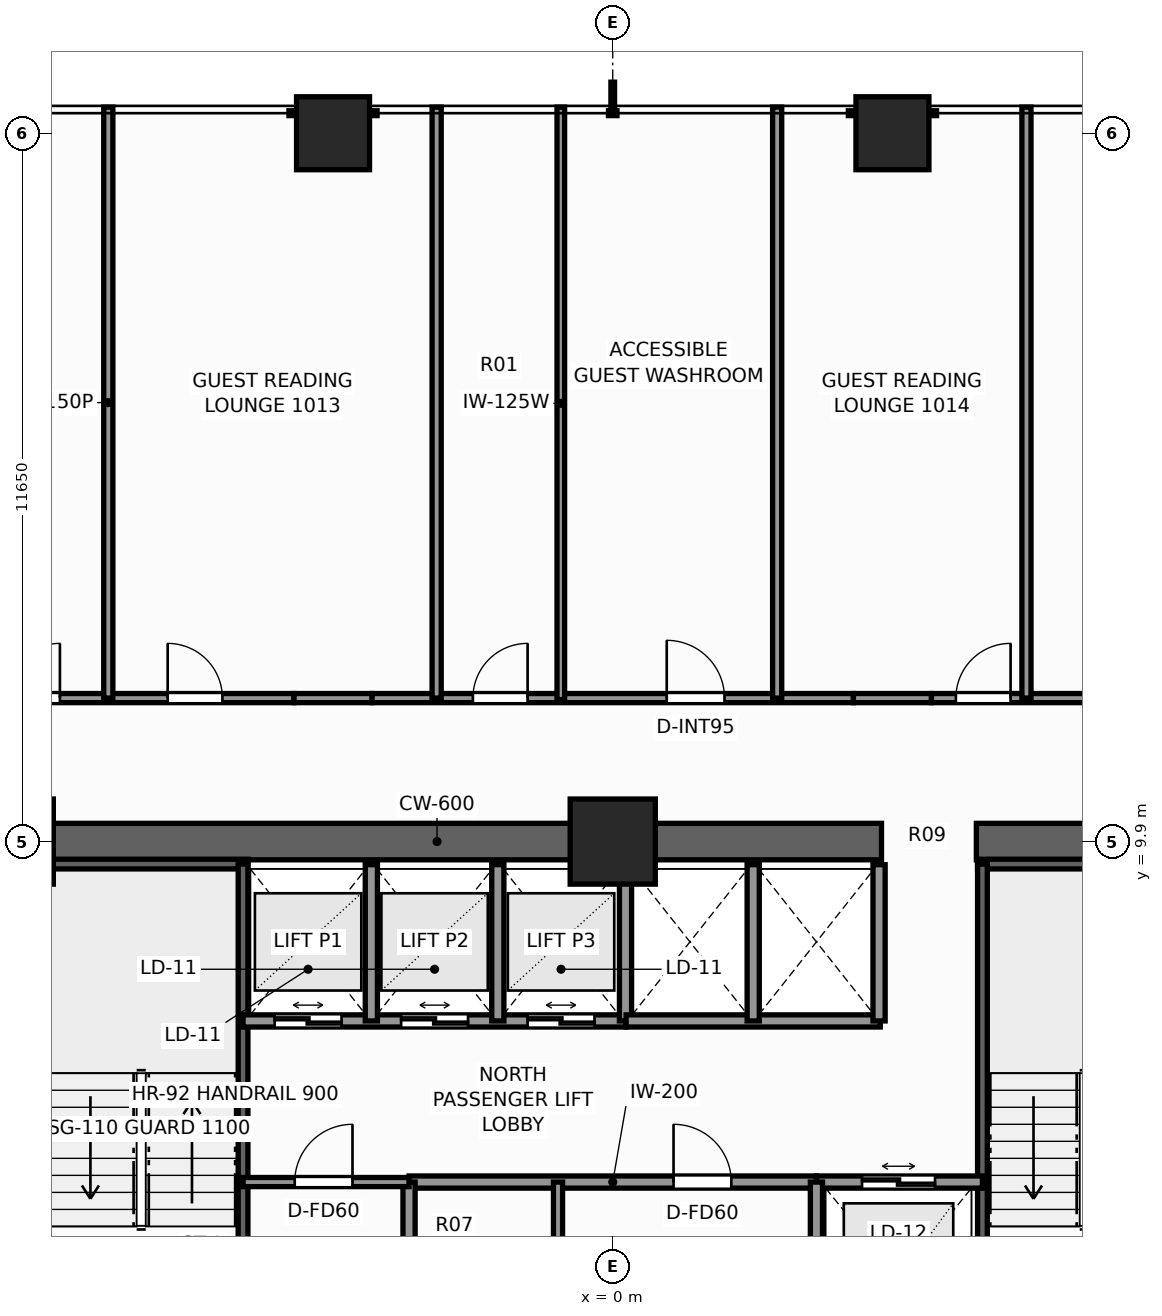
"""IFC4 building model, lengths in metres.
Left out: names, types, materials, properties, quantities, classifications, styles, units other than length and angle.
Written with IfcOpenShell. Run it as: python <this file> out.ifc"""

import sys

from ifc_helpers import new_model, si_unit, direction, frame, frame_2d, origin, origin_2d, place, context, subcontext, project, spatial, rectangle, extrude, element, fill, save


model = new_model("IFC4")
c1 = context("Model", 3, precision=1e-05, world=origin(), true_north=direction((0.0, 1.0)))
c2 = subcontext(c1, "Body", "Model", "MODEL_VIEW")
j1 = project(units=[si_unit("LENGTHUNIT", "METRE"), si_unit("PLANEANGLEUNIT", "RADIAN")], contexts=[c1])
p1 = place(None, origin())
s1 = spatial("IfcSite", under=j1, at=p1, CompositionType="ELEMENT")
p2 = place(p1, origin())
s2 = spatial("IfcBuilding", under=s1, at=p2, CompositionType="ELEMENT")
p3 = place(p2, frame((0.0, 0.0, 37.0)))
s3 = spatial("IfcBuildingStorey", under=s2, at=p3, CompositionType="ELEMENT", Elevation=37.0)
p4 = place(p3, frame((-10.2, 9.9, 0.0), z_axis=(0.0, 0.0, 1.0), x_axis=(1.0, 0.0, 0.0)))
e1 = element("IfcWall", 1, at=p4, inside=s3, PredefinedType="SHEAR", context=c2, shape_type="SweptSolid", body=[
    extrude(rectangle(XDim=14.62, YDim=0.6, at=frame_2d((7.31, 0.0))), origin(), (0.0, 0.0, 1.0), 3.3),
])
p5 = place(p3, frame((5.98, 9.9, 0.0), z_axis=(0.0, 0.0, 1.0), x_axis=(1.0, 0.0, 0.0)))
e2 = element("IfcWall", 2, at=p5, inside=s3, PredefinedType="SHEAR", context=c2, shape_type="SweptSolid", body=[
    extrude(rectangle(XDim=4.22, YDim=0.6, at=frame_2d((2.11, 0.0))), origin(), (0.0, 0.0, 1.0), 3.3),
])
for number, where, z_axis, x_axis in (
    (3, (-9.9, 9.9, 0.0), (0.0, 0.0, 1.0), (1.0, 0.0, 0.0)),
    (4, (0.0, 9.9, 0.0), (0.0, 0.0, 1.0), (1.0, 0.0, 0.0)),
):
    element("IfcColumn", number, at=place(p3, frame(where, z_axis=z_axis, x_axis=x_axis)), inside=s3, PredefinedType="COLUMN", context=c2, shape_type="SweptSolid", body=[
        extrude(rectangle(XDim=1.4, YDim=1.4, at=origin_2d()), origin(), (0.0, 0.0, 1.0), 3.3),
    ])
for number, where, z_axis, x_axis in (
    (5, (-4.6, 21.55, 0.0), (0.0, 0.0, 1.0), (1.0, 0.0, 0.0)),
    (6, (4.6, 21.55, 0.0), (0.0, 0.0, 1.0), (1.0, 0.0, 0.0)),
):
    element("IfcColumn", number, at=place(p3, frame(where, z_axis=z_axis, x_axis=x_axis)), inside=s3, PredefinedType="COLUMN", context=c2, shape_type="SweptSolid", body=[
        extrude(rectangle(XDim=1.2, YDim=1.2, at=origin_2d()), origin(), (0.0, 0.0, 1.0), 3.3),
    ])
p6 = place(p3, frame((-9.52, 9.53, 0.0), z_axis=(0.0, 0.0, 1.0), x_axis=(1.0, 0.0, 0.0)))
e7 = element("IfcWall", 7, at=p6, inside=s3, PredefinedType="SHEAR", context=c2, shape_type="SweptSolid", body=[
    extrude(rectangle(XDim=3.52, YDim=0.16, at=frame_2d((1.76, 0.0))), origin(), (0.0, 0.0, 1.0), 3.3),
])
p7 = place(p3, frame((-6.08, 1.97, 0.0), z_axis=(0.0, 0.0, 1.0), x_axis=(0.0, 1.0, 0.0)))
e8 = element("IfcWall", 8, at=p7, inside=s3, PredefinedType="SHEAR", context=c2, shape_type="SweptSolid", body=[
    extrude(rectangle(XDim=7.56, YDim=0.16, at=frame_2d((3.78, 0.0))), origin(), (0.0, 0.0, 1.0), 3.3),
])
p8 = place(p3, frame((6.0, 9.53, 0.0), z_axis=(0.0, 0.0, 1.0), x_axis=(1.0, 0.0, 0.0)))
e9 = element("IfcWall", 9, at=p8, inside=s3, PredefinedType="SHEAR", context=c2, shape_type="SweptSolid", body=[
    extrude(rectangle(XDim=3.52, YDim=0.16, at=frame_2d((1.76, 0.0))), origin(), (0.0, 0.0, 1.0), 3.3),
])
p9 = place(p3, frame((6.08, 1.97, 0.0), z_axis=(0.0, 0.0, 1.0), x_axis=(0.0, 1.0, 0.0)))
e10 = element("IfcWall", 10, at=p9, inside=s3, PredefinedType="SHEAR", context=c2, shape_type="SweptSolid", body=[
    extrude(rectangle(XDim=7.56, YDim=0.16, at=frame_2d((3.78, 0.0))), origin(), (0.0, 0.0, 1.0), 3.3),
])
p10 = place(p3, frame((3.35, 4.3, 0.0), z_axis=(0.0, 0.0, 1.0), x_axis=(1.0, 0.0, 0.0)))
e11 = element("IfcWall", 11, at=p10, inside=s3, PredefinedType="SOLIDWALL", context=c2, shape_type="SweptSolid", body=[
    extrude(rectangle(XDim=2.73, YDim=0.2, at=frame_2d((1.365, 0.0))), origin(), (0.0, 0.0, 1.0), 3.06),
])
p11 = place(p10, frame((0.75, 0.0, 0.0)))
e12 = element("IfcOpeningElement", 12, at=p11, cuts=e11, PredefinedType="OPENING", context=c2, shape_type="SweptSolid", body=[
    extrude(rectangle(XDim=1.2, YDim=2.25, at=frame_2d((0.6, 1.125))), frame((0.0, 0.11, 0.0), z_axis=(0.0, -1.0, 0.0), x_axis=(1.0, 0.0, 0.0)), (0.0, 0.0, 1.0), 0.22),
])
p12 = place(p3, frame((-6.08, 6.95, 0.0), z_axis=(0.0, 0.0, 1.0), x_axis=(1.0, 0.0, 0.0)))
e13 = element("IfcWall", 13, at=p12, inside=s3, PredefinedType="SOLIDWALL", context=c2, shape_type="SweptSolid", body=[
    extrude(rectangle(XDim=6.3, YDim=0.2, at=frame_2d((3.15, 0.0))), origin(), (0.0, 0.0, 1.0), 3.06),
])
p13 = place(p12, frame((0.52, 0.0, 0.0)))
e14 = element("IfcOpeningElement", 14, at=p13, cuts=e13, PredefinedType="OPENING", context=c2, shape_type="SweptSolid", body=[
    extrude(rectangle(XDim=1.1, YDim=2.2, at=frame_2d((0.55, 1.1))), frame((0.0, 0.11, 0.0), z_axis=(0.0, -1.0, 0.0), x_axis=(1.0, 0.0, 0.0)), (0.0, 0.0, 1.0), 0.22),
])
p14 = place(p12, frame((2.6, 0.0, 0.0)))
e15 = element("IfcOpeningElement", 15, at=p14, cuts=e13, PredefinedType="OPENING", context=c2, shape_type="SweptSolid", body=[
    extrude(rectangle(XDim=1.1, YDim=2.2, at=frame_2d((0.55, 1.1))), frame((0.0, 0.11, 0.0), z_axis=(0.0, -1.0, 0.0), x_axis=(1.0, 0.0, 0.0)), (0.0, 0.0, 1.0), 0.22),
])
p15 = place(p12, frame((4.68, 0.0, 0.0)))
e16 = element("IfcOpeningElement", 16, at=p15, cuts=e13, PredefinedType="OPENING", context=c2, shape_type="SweptSolid", body=[
    extrude(rectangle(XDim=1.1, YDim=2.2, at=frame_2d((0.55, 1.1))), frame((0.0, 0.11, 0.0), z_axis=(0.0, -1.0, 0.0), x_axis=(1.0, 0.0, 0.0)), (0.0, 0.0, 1.0), 0.22),
])
for number, where, z_axis, x_axis in (
    (17, (-3.97, 6.95, 0.0), (0.0, 0.0, 1.0), (0.0, 1.0, 0.0)),
    (18, (-1.89, 6.95, 0.0), (0.0, 0.0, 1.0), (0.0, 1.0, 0.0)),
    (19, (0.21, 6.95, 0.0), (0.0, 0.0, 1.0), (0.0, 1.0, 0.0)),
):
    element("IfcWall", number, at=place(p3, frame(where, z_axis=z_axis, x_axis=x_axis)), inside=s3, PredefinedType="SOLIDWALL", context=c2, shape_type="SweptSolid", body=[
        extrude(rectangle(XDim=2.57, YDim=0.2, at=frame_2d((1.285, 0.0))), origin(), (0.0, 0.0, 1.0), 3.06),
    ])
p16 = place(p3, frame((0.22, 6.95, 0.0), z_axis=(0.0, 0.0, 1.0), x_axis=(1.0, 0.0, 0.0)))
e20 = element("IfcWall", 20, at=p16, inside=s3, PredefinedType="SOLIDWALL", context=c2, shape_type="SweptSolid", body=[
    extrude(rectangle(XDim=4.18, YDim=0.2, at=frame_2d((2.09, 0.0))), origin(), (0.0, 0.0, 1.0), 3.06),
])
for number, where, z_axis, x_axis in (
    (21, (4.38, 6.95, 0.0), (0.0, 0.0, 1.0), (0.0, 1.0, 0.0)),
    (22, (2.31, 6.95, 0.0), (0.0, 0.0, 1.0), (0.0, 1.0, 0.0)),
):
    element("IfcWall", number, at=place(p3, frame(where, z_axis=z_axis, x_axis=x_axis)), inside=s3, PredefinedType="SOLIDWALL", context=c2, shape_type="SweptSolid", body=[
        extrude(rectangle(XDim=2.57, YDim=0.2, at=frame_2d((1.285, 0.0))), origin(), (0.0, 0.0, 1.0), 3.06),
    ])
p17 = place(p3, frame((-3.35, 4.3, 0.0), z_axis=(0.0, 0.0, 1.0), x_axis=(1.0, 0.0, 0.0)))
e23 = element("IfcWall", 23, at=p17, inside=s3, PredefinedType="SOLIDWALL", context=c2, shape_type="SweptSolid", body=[
    extrude(rectangle(XDim=6.7, YDim=0.2, at=frame_2d((3.35, 0.0))), origin(), (0.0, 0.0, 1.0), 3.06),
])
p18 = place(p17, frame((4.35, 0.0, 0.0)))
e24 = element("IfcOpeningElement", 24, at=p18, cuts=e23, PredefinedType="OPENING", context=c2, shape_type="SweptSolid", body=[
    extrude(rectangle(XDim=0.95, YDim=2.06, at=frame_2d((0.475, 1.03))), frame((0.0, 0.11, 0.0), z_axis=(0.0, -1.0, 0.0), x_axis=(1.0, 0.0, 0.0)), (0.0, 0.0, 1.0), 0.22),
])
for number, where, z_axis, x_axis in (
    (25, (-3.35, 1.1, 0.0), (0.0, 0.0, 1.0), (0.0, 1.0, 0.0)),
    (26, (3.35, 1.1, 0.0), (0.0, 0.0, 1.0), (0.0, 1.0, 0.0)),
):
    element("IfcWall", number, at=place(p3, frame(where, z_axis=z_axis, x_axis=x_axis)), inside=s3, PredefinedType="SOLIDWALL", context=c2, shape_type="SweptSolid", body=[
        extrude(rectangle(XDim=3.2, YDim=0.2, at=frame_2d((1.6, 0.0))), origin(), (0.0, 0.0, 1.0), 3.06),
    ])
p19 = place(p3, frame((-0.9, 1.05, 0.0), z_axis=(0.0, 0.0, 1.0), x_axis=(0.0, 1.0, 0.0)))
e27 = element("IfcWall", 27, at=p19, inside=s3, PredefinedType="PARTITIONING", context=c2, shape_type="SweptSolid", body=[
    extrude(rectangle(XDim=3.25, YDim=0.15, at=frame_2d((1.625, 0.0))), origin(), (0.0, 0.0, 1.0), 3.06),
])
p20 = place(p19, frame((1.1, 0.0, 0.0)))
e28 = element("IfcOpeningElement", 28, at=p20, cuts=e27, PredefinedType="OPENING", context=c2, shape_type="SweptSolid", body=[
    extrude(rectangle(XDim=0.85, YDim=2.03, at=frame_2d((0.425, 1.015))), frame((0.0, 0.085, 0.0), z_axis=(0.0, -1.0, 0.0), x_axis=(1.0, 0.0, 0.0)), (0.0, 0.0, 1.0), 0.17),
])
p21 = place(p3, frame((-6.08, 4.3, 0.0), z_axis=(0.0, 0.0, 1.0), x_axis=(1.0, 0.0, 0.0)))
e29 = element("IfcWall", 29, at=p21, inside=s3, PredefinedType="PARTITIONING", context=c2, shape_type="SweptSolid", body=[
    extrude(rectangle(XDim=2.73, YDim=0.15, at=frame_2d((1.365, 0.0))), origin(), (0.0, 0.0, 1.0), 3.06),
])
p22 = place(p21, frame((0.85, 0.0, 0.0)))
e30 = element("IfcOpeningElement", 30, at=p22, cuts=e29, PredefinedType="OPENING", context=c2, shape_type="SweptSolid", body=[
    extrude(rectangle(XDim=0.95, YDim=2.06, at=frame_2d((0.475, 1.03))), frame((0.0, 0.085, 0.0), z_axis=(0.0, -1.0, 0.0), x_axis=(1.0, 0.0, 0.0)), (0.0, 0.0, 1.0), 0.17),
])
p23 = place(p3, frame((-10.092, 12.26, 0.0), z_axis=(0.0, 0.0, 1.0), x_axis=(1.0, 0.0, 0.0)))
e31 = element("IfcWall", 31, at=p23, inside=s3, PredefinedType="PARTITIONING", context=c2, shape_type="SweptSolid", body=[
    extrude(rectangle(XDim=4.85, YDim=0.15, at=frame_2d((2.425, 0.0))), origin(), (0.0, 0.0, 1.0), 3.06),
])
p24 = place(p23, frame((0.1, 0.0, 0.0)))
e32 = element("IfcOpeningElement", 32, at=p24, cuts=e31, PredefinedType="OPENING", context=c2, shape_type="SweptSolid", body=[
    extrude(rectangle(XDim=0.9, YDim=2.06, at=frame_2d((0.45, 1.03))), frame((0.0, 0.085, 0.0), z_axis=(0.0, -1.0, 0.0), x_axis=(1.0, 0.0, 0.0)), (0.0, 0.0, 1.0), 0.17),
])
p25 = place(p23, frame((2.772, 0.0, 0.0)))
e33 = element("IfcOpeningElement", 33, at=p25, cuts=e31, PredefinedType="OPENING", context=c2, shape_type="SweptSolid", body=[
    extrude(rectangle(XDim=0.9, YDim=2.06, at=frame_2d((0.45, 1.03))), frame((0.0, 0.085, 0.0), z_axis=(0.0, -1.0, 0.0), x_axis=(1.0, 0.0, 0.0)), (0.0, 0.0, 1.0), 0.17),
])
p26 = place(p3, frame((-5.242, 12.26, 0.0), z_axis=(0.0, 0.0, 1.0), x_axis=(1.0, 0.0, 0.0)))
e34 = element("IfcWall", 34, at=p26, inside=s3, PredefinedType="PARTITIONING", context=c2, shape_type="SweptSolid", body=[
    extrude(rectangle(XDim=1.284, YDim=0.15, at=frame_2d((0.642, 0.0))), origin(), (0.0, 0.0, 1.0), 1.945),
])
p27 = place(p3, frame((-3.958, 12.26, 0.0), z_axis=(0.0, 0.0, 1.0), x_axis=(1.0, 0.0, 0.0)))
e35 = element("IfcWall", 35, at=p27, inside=s3, PredefinedType="PARTITIONING", context=c2, shape_type="SweptSolid", body=[
    extrude(rectangle(XDim=7.916, YDim=0.15, at=frame_2d((3.958, 0.0))), origin(), (0.0, 0.0, 1.0), 2.585),
])
p28 = place(p27, frame((1.658, 0.0, 0.0)))
e36 = element("IfcOpeningElement", 36, at=p28, cuts=e35, PredefinedType="OPENING", context=c2, shape_type="SweptSolid", body=[
    extrude(rectangle(XDim=0.9, YDim=2.06, at=frame_2d((0.45, 1.03))), frame((0.0, 0.085, 0.0), z_axis=(0.0, -1.0, 0.0), x_axis=(1.0, 0.0, 0.0)), (0.0, 0.0, 1.0), 0.17),
])
p29 = place(p27, frame((4.846, 0.0, 0.0)))
e37 = element("IfcOpeningElement", 37, at=p29, cuts=e35, PredefinedType="OPENING", context=c2, shape_type="SweptSolid", body=[
    extrude(rectangle(XDim=0.95, YDim=2.06, at=frame_2d((0.475, 1.03))), frame((0.0, 0.085, 0.0), z_axis=(0.0, -1.0, 0.0), x_axis=(1.0, 0.0, 0.0)), (0.0, 0.0, 1.0), 0.17),
])
p30 = place(p3, frame((3.958, 12.26, 0.0), z_axis=(0.0, 0.0, 1.0), x_axis=(1.0, 0.0, 0.0)))
e38 = element("IfcWall", 38, at=p30, inside=s3, PredefinedType="PARTITIONING", context=c2, shape_type="SweptSolid", body=[
    extrude(rectangle(XDim=1.284, YDim=0.15, at=frame_2d((0.642, 0.0))), origin(), (0.0, 0.0, 1.0), 1.945),
])
p31 = place(p3, frame((5.242, 12.26, 0.0), z_axis=(0.0, 0.0, 1.0), x_axis=(1.0, 0.0, 0.0)))
e39 = element("IfcWall", 39, at=p31, inside=s3, PredefinedType="PARTITIONING", context=c2, shape_type="SweptSolid", body=[
    extrude(rectangle(XDim=4.85, YDim=0.15, at=frame_2d((2.425, 0.0))), origin(), (0.0, 0.0, 1.0), 3.06),
])
p32 = place(p31, frame((0.401, 0.0, 0.0)))
e40 = element("IfcOpeningElement", 40, at=p32, cuts=e39, PredefinedType="OPENING", context=c2, shape_type="SweptSolid", body=[
    extrude(rectangle(XDim=0.9, YDim=2.06, at=frame_2d((0.45, 1.03))), frame((0.0, 0.085, 0.0), z_axis=(0.0, -1.0, 0.0), x_axis=(1.0, 0.0, 0.0)), (0.0, 0.0, 1.0), 0.17),
])
p33 = place(p31, frame((2.736, 0.0, 0.0)))
e41 = element("IfcOpeningElement", 41, at=p33, cuts=e39, PredefinedType="OPENING", context=c2, shape_type="SweptSolid", body=[
    extrude(rectangle(XDim=0.9, YDim=2.06, at=frame_2d((0.45, 1.03))), frame((0.0, 0.085, 0.0), z_axis=(0.0, -1.0, 0.0), x_axis=(1.0, 0.0, 0.0)), (0.0, 0.0, 1.0), 0.17),
])
for number, where, z_axis, x_axis in (
    (42, (-8.296, 12.26, 0.0), (0.0, 0.0, 1.0), (0.0, 1.0, 0.0)),
    (43, (-2.896, 12.26, 0.0), (0.0, 0.0, 1.0), (0.0, 1.0, 0.0)),
    (44, (2.704, 12.26, 0.0), (0.0, 0.0, 1.0), (0.0, 1.0, 0.0)),
):
    element("IfcWall", number, at=place(p3, frame(where, z_axis=z_axis, x_axis=x_axis)), inside=s3, PredefinedType="PARTITIONING", context=c2, shape_type="SweptSolid", body=[
        extrude(rectangle(XDim=9.72, YDim=0.15, at=frame_2d((4.86, 0.0))), origin(), (0.0, 0.0, 1.0), 2.429),
    ])
p34 = place(p3, frame((-0.854, 12.235, 0.0), z_axis=(0.0, 0.0, 1.0), x_axis=(0.0, 1.0, 0.0)))
e45 = element("IfcWall", 45, at=p34, inside=s3, PredefinedType="PARTITIONING", context=c2, shape_type="SweptSolid", body=[
    extrude(rectangle(XDim=9.745, YDim=0.125, at=frame_2d((4.873, 0.0))), origin(), (0.0, 0.0, 1.0), 2.429),
])
p35 = place(p3, frame((6.804, 12.26, 0.0), z_axis=(0.0, 0.0, 1.0), x_axis=(0.0, 1.0, 0.0)))
e46 = element("IfcWall", 46, at=p35, inside=s3, PredefinedType="PARTITIONING", context=c2, shape_type="SweptSolid", body=[
    extrude(rectangle(XDim=9.72, YDim=0.15, at=frame_2d((4.86, 0.0))), origin(), (0.0, 0.0, 1.0), 2.429),
])
p36 = place(p11, origin())
e47 = element("IfcDoor", 47, at=p36, inside=s3, OperationType="DOUBLE_DOOR_SLIDING", PredefinedType="DOOR", context=c2, shape_type="SweptSolid", body=[
    extrude(rectangle(XDim=1.2, YDim=2.25, at=frame_2d((0.6, 1.125))), frame((0.0, 0.025, 0.0), z_axis=(0.0, -1.0, 0.0), x_axis=(1.0, 0.0, 0.0)), (0.0, 0.0, 1.0), 0.05),
])
fill(e12, e47)
p37 = place(p13, origin())
e48 = element("IfcDoor", 48, at=p37, inside=s3, OperationType="DOUBLE_DOOR_SLIDING", PredefinedType="DOOR", context=c2, shape_type="SweptSolid", body=[
    extrude(rectangle(XDim=1.1, YDim=2.2, at=frame_2d((0.55, 1.1))), frame((0.0, 0.025, 0.0), z_axis=(0.0, -1.0, 0.0), x_axis=(1.0, 0.0, 0.0)), (0.0, 0.0, 1.0), 0.05),
])
fill(e14, e48)
p38 = place(p14, origin())
e49 = element("IfcDoor", 49, at=p38, inside=s3, OperationType="DOUBLE_DOOR_SLIDING", PredefinedType="DOOR", context=c2, shape_type="SweptSolid", body=[
    extrude(rectangle(XDim=1.1, YDim=2.2, at=frame_2d((0.55, 1.1))), frame((0.0, 0.025, 0.0), z_axis=(0.0, -1.0, 0.0), x_axis=(1.0, 0.0, 0.0)), (0.0, 0.0, 1.0), 0.05),
])
fill(e15, e49)
p39 = place(p15, origin())
e50 = element("IfcDoor", 50, at=p39, inside=s3, OperationType="DOUBLE_DOOR_SLIDING", PredefinedType="DOOR", context=c2, shape_type="SweptSolid", body=[
    extrude(rectangle(XDim=1.1, YDim=2.2, at=frame_2d((0.55, 1.1))), frame((0.0, 0.025, 0.0), z_axis=(0.0, -1.0, 0.0), x_axis=(1.0, 0.0, 0.0)), (0.0, 0.0, 1.0), 0.05),
])
fill(e16, e50)
p40 = place(p18, origin())
e51 = element("IfcDoor", 51, at=p40, inside=s3, OperationType="SINGLE_SWING_LEFT", PredefinedType="DOOR", context=c2, shape_type="SweptSolid", body=[
    extrude(rectangle(XDim=0.95, YDim=2.06, at=frame_2d((0.475, 1.03))), frame((0.0, 0.025, 0.0), z_axis=(0.0, -1.0, 0.0), x_axis=(1.0, 0.0, 0.0)), (0.0, 0.0, 1.0), 0.05),
])
fill(e24, e51)
p41 = place(p22, origin())
e52 = element("IfcDoor", 52, at=p41, inside=s3, OperationType="SINGLE_SWING_RIGHT", PredefinedType="DOOR", context=c2, shape_type="SweptSolid", body=[
    extrude(rectangle(XDim=0.95, YDim=2.06, at=frame_2d((0.475, 1.03))), frame((0.0, 0.025, 0.0), z_axis=(0.0, -1.0, 0.0), x_axis=(1.0, 0.0, 0.0)), (0.0, 0.0, 1.0), 0.05),
])
fill(e30, e52)
p42 = place(p24, origin())
e53 = element("IfcDoor", 53, at=p42, inside=s3, OperationType="SINGLE_SWING_RIGHT", PredefinedType="DOOR", context=c2, shape_type="SweptSolid", body=[
    extrude(rectangle(XDim=0.9, YDim=2.06, at=frame_2d((0.45, 1.03))), frame((0.0, 0.025, 0.0), z_axis=(0.0, -1.0, 0.0), x_axis=(1.0, 0.0, 0.0)), (0.0, 0.0, 1.0), 0.05),
])
fill(e32, e53)
p43 = place(p25, origin())
e54 = element("IfcDoor", 54, at=p43, inside=s3, OperationType="SINGLE_SWING_LEFT", PredefinedType="DOOR", context=c2, shape_type="SweptSolid", body=[
    extrude(rectangle(XDim=0.9, YDim=2.06, at=frame_2d((0.45, 1.03))), frame((0.0, 0.025, 0.0), z_axis=(0.0, -1.0, 0.0), x_axis=(1.0, 0.0, 0.0)), (0.0, 0.0, 1.0), 0.05),
])
fill(e33, e54)
p44 = place(p28, origin())
e55 = element("IfcDoor", 55, at=p44, inside=s3, OperationType="SINGLE_SWING_RIGHT", PredefinedType="DOOR", context=c2, shape_type="SweptSolid", body=[
    extrude(rectangle(XDim=0.9, YDim=2.06, at=frame_2d((0.45, 1.03))), frame((0.0, 0.025, 0.0), z_axis=(0.0, -1.0, 0.0), x_axis=(1.0, 0.0, 0.0)), (0.0, 0.0, 1.0), 0.05),
])
fill(e36, e55)
p45 = place(p29, origin())
e56 = element("IfcDoor", 56, at=p45, inside=s3, OperationType="SINGLE_SWING_LEFT", PredefinedType="DOOR", context=c2, shape_type="SweptSolid", body=[
    extrude(rectangle(XDim=0.95, YDim=2.06, at=frame_2d((0.475, 1.03))), frame((0.0, 0.025, 0.0), z_axis=(0.0, -1.0, 0.0), x_axis=(1.0, 0.0, 0.0)), (0.0, 0.0, 1.0), 0.05),
])
fill(e37, e56)
p46 = place(p32, origin())
e57 = element("IfcDoor", 57, at=p46, inside=s3, OperationType="SINGLE_SWING_RIGHT", PredefinedType="DOOR", context=c2, shape_type="SweptSolid", body=[
    extrude(rectangle(XDim=0.9, YDim=2.06, at=frame_2d((0.45, 1.03))), frame((0.0, 0.025, 0.0), z_axis=(0.0, -1.0, 0.0), x_axis=(1.0, 0.0, 0.0)), (0.0, 0.0, 1.0), 0.05),
])
fill(e40, e57)
save(model, sys.argv[1])
